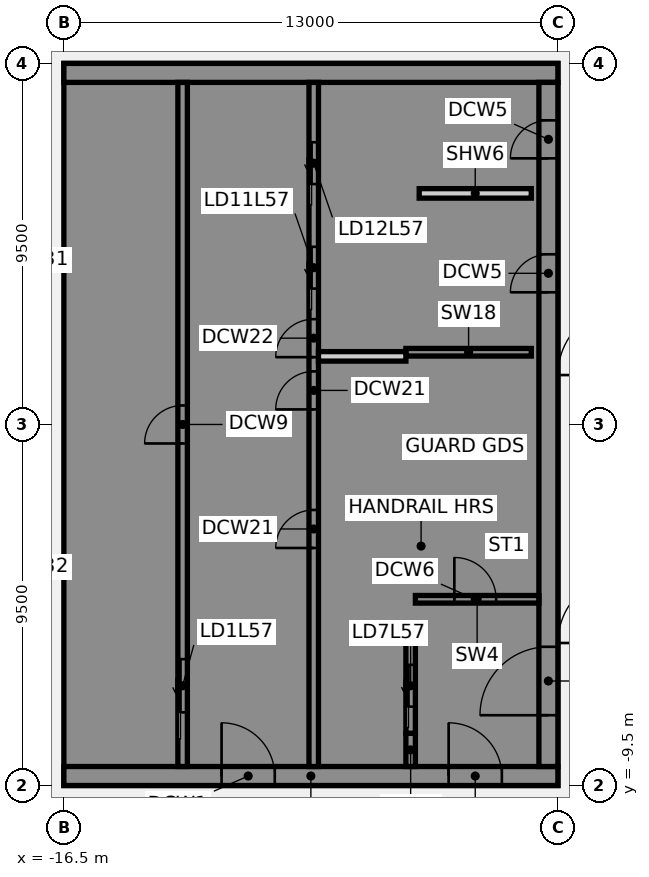
"""IFC4 building model, lengths in metres.
Left out: names, types, materials, properties, quantities, classifications, styles, units other than length and angle.
Written with IfcOpenShell. Run it as: python <this file> out.ifc"""

import sys

from ifc_helpers import new_model, si_unit, direction, frame, frame_2d, origin, place, context, subcontext, project, spatial, polyline, rectangle, outline, extrude, element, fill, save


model = new_model("IFC4")
c1 = context("Model", 3, precision=1e-05, world=origin(), true_north=direction((0.0, 1.0)))
c2 = subcontext(c1, "Body", "Model", "MODEL_VIEW")
j1 = project(units=[si_unit("LENGTHUNIT", "METRE"), si_unit("PLANEANGLEUNIT", "RADIAN")], contexts=[c1])
p1 = place(None, origin())
s1 = spatial("IfcSite", under=j1, at=p1, CompositionType="ELEMENT")
p2 = place(p1, origin())
s2 = spatial("IfcBuilding", under=s1, at=p2, CompositionType="ELEMENT")
p3 = place(p2, frame((0.0, 0.0, 227.1)))
s3 = spatial("IfcBuildingStorey", under=s2, at=p3, CompositionType="ELEMENT", Elevation=227.1)
p4 = place(p3, frame((-16.5, -9.25, 0.0), z_axis=(0.0, 0.0, 1.0), x_axis=(1.0, 0.0, 0.0)))
e1 = element("IfcWall", 1, at=p4, inside=s3, PredefinedType="SHEAR", context=c2, shape_type="SweptSolid", body=[
    extrude(rectangle(XDim=13.0, YDim=0.5, at=frame_2d((6.5, 0.0))), origin(), (0.0, 0.0, 1.0), 3.46),
])
p5 = place(p4, frame((4.15, 0.0, 0.0)))
e2 = element("IfcOpeningElement", 2, at=p5, cuts=e1, PredefinedType="OPENING", context=c2, shape_type="SweptSolid", body=[
    extrude(rectangle(XDim=1.4, YDim=2.1, at=frame_2d((0.7, 1.05))), frame((0.0, 0.26, 0.0), z_axis=(0.0, -1.0, 0.0), x_axis=(1.0, 0.0, 0.0)), (0.0, 0.0, 1.0), 0.52),
])
p6 = place(p4, frame((10.125, 0.0, 0.0)))
e3 = element("IfcOpeningElement", 3, at=p6, cuts=e1, PredefinedType="OPENING", context=c2, shape_type="SweptSolid", body=[
    extrude(rectangle(XDim=1.4, YDim=2.1, at=frame_2d((0.7, 1.05))), frame((0.0, 0.26, 0.0), z_axis=(0.0, -1.0, 0.0), x_axis=(1.0, 0.0, 0.0)), (0.0, 0.0, 1.0), 0.52),
])
p7 = place(p3, origin())
e4 = element("IfcWall", 4, at=p7, inside=s3, PredefinedType="SHEAR", context=c2, shape_type="SweptSolid", body=[
    extrude(outline(polyline([(-13.5, -8.125), (-16.0, -8.125), (-16.0, -5.625), (-13.5, -5.625), (-13.5, -5.375), (-16.0, -5.375), (-16.0, 5.375), (-13.5, 5.375), (-13.5, 5.625), (-16.0, 5.625), (-16.0, 8.125), (-13.5, 8.125), (-13.5, 9.0), (-16.0, 9.0), (-16.5, 9.0), (-16.5, -9.0), (-16.0, -9.0), (-13.5, -9.0), (-13.5, -8.125)])), origin(), (0.0, 0.0, 1.0), 3.46),
])
p8 = place(p3, frame((-16.5, 9.25, 0.0), z_axis=(0.0, 0.0, 1.0), x_axis=(1.0, 0.0, 0.0)))
e5 = element("IfcWall", 5, at=p8, inside=s3, PredefinedType="SHEAR", context=c2, shape_type="SweptSolid", body=[
    extrude(rectangle(XDim=13.0, YDim=0.5, at=frame_2d((6.5, 0.0))), origin(), (0.0, 0.0, 1.0), 3.46),
])
p9 = place(p3, origin())
e6 = element("IfcWall", 6, at=p9, inside=s3, PredefinedType="SHEAR", context=c2, shape_type="SweptSolid", body=[
    extrude(outline(polyline([(-9.8, -5.375), (-9.8, -5.625), (-7.5, -5.625), (-7.25, -5.625), (-7.25, 9.0), (-7.5, 9.0), (-9.8, 9.0), (-9.8, 8.125), (-7.5, 8.125), (-7.5, 5.625), (-9.8, 5.625), (-9.8, 5.375), (-7.5, 5.375), (-7.5, 2.875), (-9.8, 2.875), (-9.8, 2.625), (-7.5, 2.625), (-7.5, -5.375), (-9.8, -5.375)])), origin(), (0.0, 0.0, 1.0), 3.46),
])
p10 = place(p3, origin())
e7 = element("IfcWall", 7, at=p10, inside=s3, PredefinedType="SHEAR", context=c2, shape_type="SweptSolid", body=[
    extrude(outline(polyline([(-7.5, -8.125), (-9.55, -8.125), (-9.55, -5.625), (-9.8, -5.625), (-9.8, -8.125), (-9.8, -9.0), (-7.5, -9.0), (-7.5, -8.125)])), origin(), (0.0, 0.0, 1.0), 3.46),
])
p11 = place(p3, frame((-7.375, -9.0, 0.0), z_axis=(0.0, 0.0, 1.0), x_axis=(0.0, 1.0, 0.0)))
e8 = element("IfcWall", 8, at=p11, inside=s3, PredefinedType="SHEAR", context=c2, shape_type="SweptSolid", body=[
    extrude(rectangle(XDim=0.875, YDim=0.25, at=frame_2d((0.438, 0.0))), origin(), (0.0, 0.0, 1.0), 3.46),
])
p12 = place(p3, frame((-7.5, 1.9, 0.0), z_axis=(0.0, 0.0, 1.0), x_axis=(1.0, 0.0, 0.0)))
e9 = element("IfcWall", 9, at=p12, inside=s3, PredefinedType="SHEAR", context=c2, shape_type="SweptSolid", body=[
    extrude(rectangle(XDim=3.3, YDim=0.2, at=frame_2d((1.65, 0.0))), origin(), (0.0, 0.0, 1.0), 3.46),
])
p13 = place(p3, frame((-13.375, -9.0, 0.0), z_axis=(0.0, 0.0, 1.0), x_axis=(0.0, 1.0, 0.0)))
e10 = element("IfcWall", 10, at=p13, inside=s3, PredefinedType="SHEAR", context=c2, shape_type="SweptSolid", body=[
    extrude(rectangle(XDim=18.0, YDim=0.25, at=frame_2d((9.0, 0.0))), origin(), (0.0, 0.0, 1.0), 3.46),
])
p14 = place(p13, frame((1.425, 0.0, 0.0)))
e11 = element("IfcOpeningElement", 11, at=p14, cuts=e10, PredefinedType="OPENING", context=c2, shape_type="SweptSolid", body=[
    extrude(rectangle(XDim=1.4, YDim=2.1, at=frame_2d((0.7, 1.05))), frame((0.0, 0.135, 0.0), z_axis=(0.0, -1.0, 0.0), x_axis=(1.0, 0.0, 0.0)), (0.0, 0.0, 1.0), 0.27),
])
p15 = place(p13, frame((8.5, 0.0, 0.0)))
e12 = element("IfcOpeningElement", 12, at=p15, cuts=e10, PredefinedType="OPENING", context=c2, shape_type="SweptSolid", body=[
    extrude(rectangle(XDim=1.0, YDim=2.1, at=frame_2d((0.5, 1.05))), frame((0.0, 0.135, 0.0), z_axis=(0.0, -1.0, 0.0), x_axis=(1.0, 0.0, 0.0)), (0.0, 0.0, 1.0), 0.27),
])
p16 = place(p3, frame((-9.925, -9.0, 0.0), z_axis=(0.0, 0.0, 1.0), x_axis=(0.0, 1.0, 0.0)))
e13 = element("IfcWall", 13, at=p16, inside=s3, PredefinedType="SHEAR", context=c2, shape_type="SweptSolid", body=[
    extrude(rectangle(XDim=18.0, YDim=0.25, at=frame_2d((9.0, 0.0))), origin(), (0.0, 0.0, 1.0), 3.46),
])
p17 = place(p16, frame((12.575, 0.0, 0.0)))
e14 = element("IfcOpeningElement", 14, at=p17, cuts=e13, PredefinedType="OPENING", context=c2, shape_type="SweptSolid", body=[
    extrude(rectangle(XDim=1.1, YDim=2.1, at=frame_2d((0.55, 1.05))), frame((0.0, 0.135, 0.0), z_axis=(0.0, -1.0, 0.0), x_axis=(1.0, 0.0, 0.0)), (0.0, 0.0, 1.0), 0.27),
])
p18 = place(p16, frame((15.325, 0.0, 0.0)))
e15 = element("IfcOpeningElement", 15, at=p18, cuts=e13, PredefinedType="OPENING", context=c2, shape_type="SweptSolid", body=[
    extrude(rectangle(XDim=1.1, YDim=2.1, at=frame_2d((0.55, 1.05))), frame((0.0, 0.135, 0.0), z_axis=(0.0, -1.0, 0.0), x_axis=(1.0, 0.0, 0.0)), (0.0, 0.0, 1.0), 0.27),
])
p19 = place(p16, frame((5.75, 0.0, 0.0)))
e16 = element("IfcOpeningElement", 16, at=p19, cuts=e13, PredefinedType="OPENING", context=c2, shape_type="SweptSolid", body=[
    extrude(rectangle(XDim=1.0, YDim=2.1, at=frame_2d((0.5, 1.05))), frame((0.0, 0.135, 0.0), z_axis=(0.0, -1.0, 0.0), x_axis=(1.0, 0.0, 0.0)), (0.0, 0.0, 1.0), 0.27),
])
p20 = place(p16, frame((9.396, 0.0, 0.0)))
e17 = element("IfcOpeningElement", 17, at=p20, cuts=e13, PredefinedType="OPENING", context=c2, shape_type="SweptSolid", body=[
    extrude(rectangle(XDim=1.0, YDim=2.1, at=frame_2d((0.5, 1.05))), frame((0.0, 0.135, 0.0), z_axis=(0.0, -1.0, 0.0), x_axis=(1.0, 0.0, 0.0)), (0.0, 0.0, 1.0), 0.27),
])
p21 = place(p16, frame((10.771, 0.0, 0.0)))
e18 = element("IfcOpeningElement", 18, at=p21, cuts=e13, PredefinedType="OPENING", context=c2, shape_type="SweptSolid", body=[
    extrude(rectangle(XDim=1.0, YDim=2.1, at=frame_2d((0.5, 1.05))), frame((0.0, 0.135, 0.0), z_axis=(0.0, -1.0, 0.0), x_axis=(1.0, 0.0, 0.0)), (0.0, 0.0, 1.0), 0.27),
])
p22 = place(p3, frame((-7.375, -8.125, 0.0), z_axis=(0.0, 0.0, 1.0), x_axis=(0.0, 1.0, 0.0)))
e19 = element("IfcWall", 19, at=p22, inside=s3, PredefinedType="SHEAR", context=c2, shape_type="SweptSolid", body=[
    extrude(rectangle(XDim=2.5, YDim=0.25, at=frame_2d((1.25, 0.0))), origin(), (0.0, 0.0, 1.0), 3.46),
])
p23 = place(p22, frame((0.7, 0.0, 0.0)))
e20 = element("IfcOpeningElement", 20, at=p23, cuts=e19, PredefinedType="OPENING", context=c2, shape_type="SweptSolid", body=[
    extrude(rectangle(XDim=1.1, YDim=2.1, at=frame_2d((0.55, 1.05))), frame((0.0, 0.135, 0.0), z_axis=(0.0, -1.0, 0.0), x_axis=(1.0, 0.0, 0.0)), (0.0, 0.0, 1.0), 0.27),
])
p24 = place(p3, frame((-3.75, -9.0, 0.0), z_axis=(0.0, 0.0, 1.0), x_axis=(0.0, 1.0, 0.0)))
e21 = element("IfcWall", 21, at=p24, inside=s3, PredefinedType="SHEAR", context=c2, shape_type="SweptSolid", body=[
    extrude(rectangle(XDim=18.0, YDim=0.5, at=frame_2d((9.0, 0.0))), origin(), (0.0, 0.0, 1.0), 3.46),
])
p25 = place(p24, frame((1.35, 0.0, 0.0)))
e22 = element("IfcOpeningElement", 22, at=p25, cuts=e21, PredefinedType="OPENING", context=c2, shape_type="SweptSolid", body=[
    extrude(rectangle(XDim=1.8, YDim=2.1, at=frame_2d((0.9, 1.05))), frame((0.0, 0.26, 0.0), z_axis=(0.0, -1.0, 0.0), x_axis=(1.0, 0.0, 0.0)), (0.0, 0.0, 1.0), 0.52),
])
p26 = place(p24, frame((12.478, 0.0, 0.0)))
e23 = element("IfcOpeningElement", 23, at=p26, cuts=e21, PredefinedType="OPENING", context=c2, shape_type="SweptSolid", body=[
    extrude(rectangle(XDim=1.0, YDim=2.1, at=frame_2d((0.5, 1.05))), frame((0.0, 0.26, 0.0), z_axis=(0.0, -1.0, 0.0), x_axis=(1.0, 0.0, 0.0)), (0.0, 0.0, 1.0), 0.52),
])
p27 = place(p24, frame((16.002, 0.0, 0.0)))
e24 = element("IfcOpeningElement", 24, at=p27, cuts=e21, PredefinedType="OPENING", context=c2, shape_type="SweptSolid", body=[
    extrude(rectangle(XDim=1.0, YDim=2.1, at=frame_2d((0.5, 1.05))), frame((0.0, 0.26, 0.0), z_axis=(0.0, -1.0, 0.0), x_axis=(1.0, 0.0, 0.0)), (0.0, 0.0, 1.0), 0.52),
])
p28 = place(p3, frame((-7.15, 6.08, 0.0), z_axis=(0.0, 0.0, 1.0), x_axis=(1.0, 0.0, 0.0)))
e25 = element("IfcWall", 25, at=p28, inside=s3, PredefinedType="PARTITIONING", context=c2, shape_type="SweptSolid", body=[
    extrude(rectangle(XDim=2.95, YDim=0.25, at=frame_2d((1.475, 0.0))), origin(), (0.0, 0.0, 1.0), 3.46),
])
p29 = place(p3, frame((-7.25, -4.6, 0.0), z_axis=(0.0, 0.0, 1.0), x_axis=(1.0, 0.0, 0.0)))
e26 = element("IfcWall", 26, at=p29, inside=s3, PredefinedType="SHEAR", context=c2, shape_type="SweptSolid", body=[
    extrude(rectangle(XDim=3.25, YDim=0.2, at=frame_2d((1.625, 0.0))), origin(), (0.0, 0.0, 1.0), 3.46),
])
p30 = place(p29, frame((1.025, 0.0, 0.0)))
e27 = element("IfcOpeningElement", 27, at=p30, cuts=e26, PredefinedType="OPENING", context=c2, shape_type="SweptSolid", body=[
    extrude(rectangle(XDim=1.1, YDim=2.1, at=frame_2d((0.55, 1.05))), frame((0.0, 0.11, 0.0), z_axis=(0.0, -1.0, 0.0), x_axis=(1.0, 0.0, 0.0)), (0.0, 0.0, 1.0), 0.22),
])
p31 = place(p3, frame((-9.8, 1.792, 0.0), z_axis=(0.0, 0.0, 1.0), x_axis=(1.0, 0.0, 0.0)))
e28 = element("IfcWall", 28, at=p31, inside=s3, PredefinedType="PARTITIONING", context=c2, shape_type="SweptSolid", body=[
    extrude(rectangle(XDim=2.3, YDim=0.25, at=frame_2d((1.15, 0.0))), origin(), (0.0, 0.0, 1.0), 3.46),
])
p32 = place(p5, origin())
e29 = element("IfcDoor", 29, at=p32, inside=s3, OperationType="SINGLE_SWING_LEFT", PredefinedType="DOOR", context=c2, shape_type="SweptSolid", body=[
    extrude(rectangle(XDim=1.4, YDim=2.1, at=frame_2d((0.7, 1.05))), frame((0.0, 0.025, 0.0), z_axis=(0.0, -1.0, 0.0), x_axis=(1.0, 0.0, 0.0)), (0.0, 0.0, 1.0), 0.05),
])
fill(e2, e29)
p33 = place(p6, origin())
e30 = element("IfcDoor", 30, at=p33, inside=s3, OperationType="SINGLE_SWING_LEFT", PredefinedType="DOOR", context=c2, shape_type="SweptSolid", body=[
    extrude(rectangle(XDim=1.4, YDim=2.1, at=frame_2d((0.7, 1.05))), frame((0.0, 0.025, 0.0), z_axis=(0.0, -1.0, 0.0), x_axis=(1.0, 0.0, 0.0)), (0.0, 0.0, 1.0), 0.05),
])
fill(e3, e30)
p34 = place(p25, origin())
e31 = element("IfcDoor", 31, at=p34, inside=s3, OperationType="SINGLE_SWING_LEFT", PredefinedType="DOOR", context=c2, shape_type="SweptSolid", body=[
    extrude(rectangle(XDim=1.8, YDim=2.1, at=frame_2d((0.9, 1.05))), frame((0.0, 0.025, 0.0), z_axis=(0.0, -1.0, 0.0), x_axis=(1.0, 0.0, 0.0)), (0.0, 0.0, 1.0), 0.05),
])
fill(e22, e31)
p35 = place(p26, origin())
e32 = element("IfcDoor", 32, at=p35, inside=s3, OperationType="SINGLE_SWING_LEFT", PredefinedType="DOOR", context=c2, shape_type="SweptSolid", body=[
    extrude(rectangle(XDim=1.0, YDim=2.1, at=frame_2d((0.5, 1.05))), frame((0.0, 0.225, 0.0), z_axis=(0.0, -1.0, 0.0), x_axis=(1.0, 0.0, 0.0)), (0.0, 0.0, 1.0), 0.05),
])
fill(e23, e32)
p36 = place(p27, origin())
e33 = element("IfcDoor", 33, at=p36, inside=s3, OperationType="SINGLE_SWING_LEFT", PredefinedType="DOOR", context=c2, shape_type="SweptSolid", body=[
    extrude(rectangle(XDim=1.0, YDim=2.1, at=frame_2d((0.5, 1.05))), frame((0.0, 0.225, 0.0), z_axis=(0.0, -1.0, 0.0), x_axis=(1.0, 0.0, 0.0)), (0.0, 0.0, 1.0), 0.05),
])
fill(e24, e33)
p37 = place(p30, origin())
e34 = element("IfcDoor", 34, at=p37, inside=s3, OperationType="SINGLE_SWING_LEFT", PredefinedType="DOOR", context=c2, shape_type="SweptSolid", body=[
    extrude(rectangle(XDim=1.1, YDim=2.1, at=frame_2d((0.55, 1.05))), frame((0.0, 0.025, 0.0), z_axis=(0.0, -1.0, 0.0), x_axis=(1.0, 0.0, 0.0)), (0.0, 0.0, 1.0), 0.05),
])
fill(e27, e34)
p38 = place(p14, origin())
e35 = element("IfcDoor", 35, at=p38, inside=s3, OperationType="SLIDING_TO_LEFT", PredefinedType="DOOR", context=c2, shape_type="SweptSolid", body=[
    extrude(rectangle(XDim=1.4, YDim=2.1, at=frame_2d((0.7, 1.05))), frame((0.0, 0.025, 0.0), z_axis=(0.0, -1.0, 0.0), x_axis=(1.0, 0.0, 0.0)), (0.0, 0.0, 1.0), 0.05),
])
fill(e11, e35)
p39 = place(p23, origin())
e36 = element("IfcDoor", 36, at=p39, inside=s3, OperationType="SLIDING_TO_LEFT", PredefinedType="DOOR", context=c2, shape_type="SweptSolid", body=[
    extrude(rectangle(XDim=1.1, YDim=2.1, at=frame_2d((0.55, 1.05))), frame((0.0, 0.025, 0.0), z_axis=(0.0, -1.0, 0.0), x_axis=(1.0, 0.0, 0.0)), (0.0, 0.0, 1.0), 0.05),
])
fill(e20, e36)
p40 = place(p17, origin())
e37 = element("IfcDoor", 37, at=p40, inside=s3, OperationType="SLIDING_TO_LEFT", PredefinedType="DOOR", context=c2, shape_type="SweptSolid", body=[
    extrude(rectangle(XDim=1.1, YDim=2.1, at=frame_2d((0.55, 1.05))), frame((0.0, 0.025, 0.0), z_axis=(0.0, -1.0, 0.0), x_axis=(1.0, 0.0, 0.0)), (0.0, 0.0, 1.0), 0.05),
])
fill(e14, e37)
p41 = place(p18, origin())
e38 = element("IfcDoor", 38, at=p41, inside=s3, OperationType="SLIDING_TO_LEFT", PredefinedType="DOOR", context=c2, shape_type="SweptSolid", body=[
    extrude(rectangle(XDim=1.1, YDim=2.1, at=frame_2d((0.55, 1.05))), frame((0.0, 0.025, 0.0), z_axis=(0.0, -1.0, 0.0), x_axis=(1.0, 0.0, 0.0)), (0.0, 0.0, 1.0), 0.05),
])
fill(e15, e38)
p42 = place(p15, origin())
e39 = element("IfcDoor", 39, at=p42, inside=s3, OperationType="SINGLE_SWING_LEFT", PredefinedType="DOOR", context=c2, shape_type="SweptSolid", body=[
    extrude(rectangle(XDim=1.0, YDim=2.1, at=frame_2d((0.5, 1.05))), frame((0.0, 0.025, 0.0), z_axis=(0.0, -1.0, 0.0), x_axis=(1.0, 0.0, 0.0)), (0.0, 0.0, 1.0), 0.05),
])
fill(e12, e39)
p43 = place(p19, origin())
e40 = element("IfcDoor", 40, at=p43, inside=s3, OperationType="SINGLE_SWING_LEFT", PredefinedType="DOOR", context=c2, shape_type="SweptSolid", body=[
    extrude(rectangle(XDim=1.0, YDim=2.1, at=frame_2d((0.5, 1.05))), frame((0.0, 0.025, 0.0), z_axis=(0.0, -1.0, 0.0), x_axis=(1.0, 0.0, 0.0)), (0.0, 0.0, 1.0), 0.05),
])
fill(e16, e40)
p44 = place(p20, origin())
e41 = element("IfcDoor", 41, at=p44, inside=s3, OperationType="SINGLE_SWING_LEFT", PredefinedType="DOOR", context=c2, shape_type="SweptSolid", body=[
    extrude(rectangle(XDim=1.0, YDim=2.1, at=frame_2d((0.5, 1.05))), frame((0.0, 0.025, 0.0), z_axis=(0.0, -1.0, 0.0), x_axis=(1.0, 0.0, 0.0)), (0.0, 0.0, 1.0), 0.05),
])
fill(e17, e41)
p45 = place(p21, origin())
e42 = element("IfcDoor", 42, at=p45, inside=s3, OperationType="SINGLE_SWING_LEFT", PredefinedType="DOOR", context=c2, shape_type="SweptSolid", body=[
    extrude(rectangle(XDim=1.0, YDim=2.1, at=frame_2d((0.5, 1.05))), frame((0.0, 0.025, 0.0), z_axis=(0.0, -1.0, 0.0), x_axis=(1.0, 0.0, 0.0)), (0.0, 0.0, 1.0), 0.05),
])
fill(e18, e42)
save(model, sys.argv[1])
